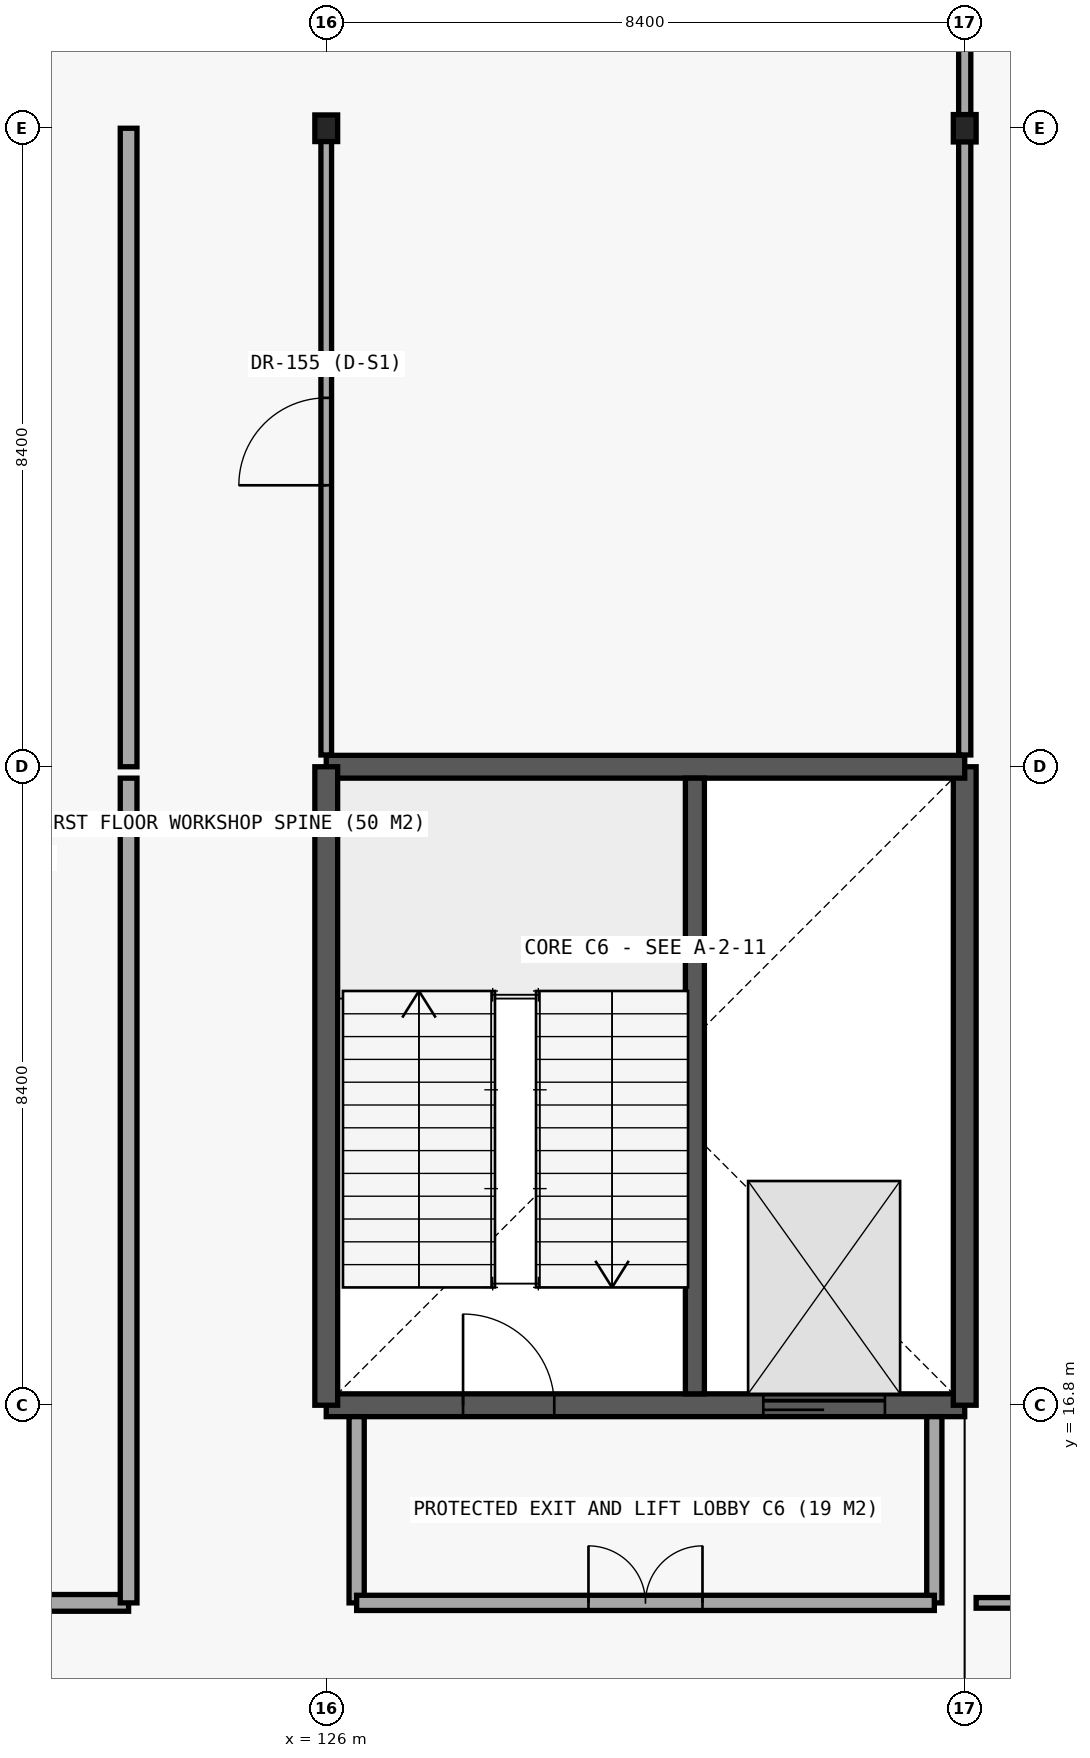
"""IFC4 building model, lengths in metres.
Left out: names, types, materials, properties, quantities, classifications, styles, units other than length and angle.
Written with IfcOpenShell. Run it as: python <this file> out.ifc"""

import sys

from ifc_helpers import new_model, si_unit, direction, frame, frame_2d, origin, origin_2d, place, context, subcontext, project, spatial, rectangle, i_section, extrude, element, fill, save


model = new_model("IFC4")
c1 = context("Model", 3, precision=1e-05, world=origin(), true_north=direction((0.0, 1.0)))
c2 = subcontext(c1, "Body", "Model", "MODEL_VIEW")
j1 = project(units=[si_unit("LENGTHUNIT", "METRE"), si_unit("PLANEANGLEUNIT", "RADIAN")], contexts=[c1])
p1 = place(None, origin())
s1 = spatial("IfcSite", under=j1, at=p1, CompositionType="ELEMENT")
p2 = place(p1, origin())
s2 = spatial("IfcBuilding", under=s1, at=p2, CompositionType="ELEMENT")
p3 = place(p2, frame((0.0, 0.0, 4.8)))
s3 = spatial("IfcBuildingStorey", under=s2, at=p3, CompositionType="ELEMENT", Elevation=4.8)
p4 = place(p3, frame((126.0, 16.8, 0.0), z_axis=(0.0, 0.0, 1.0), x_axis=(1.0, 0.0, 0.0)))
e1 = element("IfcWall", 1, at=p4, inside=s3, PredefinedType="SHEAR", context=c2, shape_type="SweptSolid", body=[
    extrude(rectangle(XDim=8.4, YDim=0.3, at=frame_2d((4.2, 0.0))), origin(), (0.0, 0.0, 1.0), 4.2),
])
p5 = place(p4, frame((1.8, 0.0, 0.0)))
e2 = element("IfcOpeningElement", 2, at=p5, cuts=e1, PredefinedType="OPENING", context=c2, shape_type="SweptSolid", body=[
    extrude(rectangle(XDim=1.2, YDim=2.2, at=frame_2d((0.6, 1.1))), frame((0.0, 0.16, 0.0), z_axis=(0.0, -1.0, 0.0), x_axis=(1.0, 0.0, 0.0)), (0.0, 0.0, 1.0), 0.32),
])
p6 = place(p4, frame((5.75, 0.0, 0.0)))
e3 = element("IfcOpeningElement", 3, at=p6, cuts=e1, PredefinedType="OPENING", context=c2, shape_type="SweptSolid", body=[
    extrude(rectangle(XDim=1.6, YDim=2.4, at=frame_2d((0.8, 1.2))), frame((0.0, 0.16, 0.0), z_axis=(0.0, -1.0, 0.0), x_axis=(1.0, 0.0, 0.0)), (0.0, 0.0, 1.0), 0.32),
])
for number, where, z_axis, x_axis in (
    (4, (134.4, 16.8, 0.0), (0.0, 0.0, 1.0), (0.0, 1.0, 0.0)),
    (5, (134.4, 25.2, 0.0), (0.0, 0.0, 1.0), (-1.0, 0.0, 0.0)),
    (6, (126.0, 25.2, 0.0), (0.0, 0.0, 1.0), (0.0, -1.0, 0.0)),
):
    element("IfcWall", number, at=place(p3, frame(where, z_axis=z_axis, x_axis=x_axis)), inside=s3, PredefinedType="SHEAR", context=c2, shape_type="SweptSolid", body=[
        extrude(rectangle(XDim=8.4, YDim=0.3, at=frame_2d((4.2, 0.0))), origin(), (0.0, 0.0, 1.0), 4.2),
    ])
p7 = place(p3, frame((130.85, 16.95, 0.0), z_axis=(0.0, 0.0, 1.0), x_axis=(0.0, 1.0, 0.0)))
e7 = element("IfcWall", 7, at=p7, inside=s3, PredefinedType="SHEAR", context=c2, shape_type="SweptSolid", body=[
    extrude(rectangle(XDim=8.1, YDim=0.25, at=frame_2d((4.05, 0.0))), origin(), (0.0, 0.0, 1.0), 4.2),
])
p8 = place(p3, frame((126.0, 33.6, 0.0), z_axis=(0.0, 0.0, 1.0), x_axis=(1.0, 0.0, 0.0)))
e8 = element("IfcColumn", 8, at=p8, inside=s3, PredefinedType="COLUMN", context=c2, shape_type="SweptSolid", body=[
    extrude(i_section(OverallWidth=0.3, OverallDepth=0.35, WebThickness=0.01, FlangeThickness=0.018, FilletRadius=0.027, at=origin_2d()), origin(), (0.0, 0.0, 1.0), 4.2),
])
p9 = place(p3, frame((134.4, 33.6, 0.0), z_axis=(0.0, 0.0, 1.0), x_axis=(1.0, 0.0, 0.0)))
e9 = element("IfcColumn", 9, at=p9, inside=s3, PredefinedType="COLUMN", context=c2, shape_type="SweptSolid", body=[
    extrude(i_section(OverallWidth=0.3, OverallDepth=0.36, WebThickness=0.012, FlangeThickness=0.022, FilletRadius=0.027, at=origin_2d()), origin(), (0.0, 0.0, 1.0), 4.2),
])
for number, where, z_axis, x_axis in (
    (10, (126.4, 14.2, 0.0), (0.0, 0.0, 1.0), (0.0, 1.0, 0.0)),
    (11, (134.0, 14.2, 0.0), (0.0, 0.0, 1.0), (0.0, 1.0, 0.0)),
):
    element("IfcWall", number, at=place(p3, frame(where, z_axis=z_axis, x_axis=x_axis)), inside=s3, PredefinedType="PARTITIONING", context=c2, shape_type="SweptSolid", body=[
        extrude(rectangle(XDim=2.45, YDim=0.2, at=frame_2d((1.225, 0.0))), origin(), (0.0, 0.0, 1.0), 3.52),
    ])
p10 = place(p3, frame((126.4, 14.2, 0.0), z_axis=(0.0, 0.0, 1.0), x_axis=(1.0, 0.0, 0.0)))
e12 = element("IfcWall", 12, at=p10, inside=s3, PredefinedType="PARTITIONING", context=c2, shape_type="SweptSolid", body=[
    extrude(rectangle(XDim=7.6, YDim=0.2, at=frame_2d((3.8, 0.0))), origin(), (0.0, 0.0, 1.0), 3.52),
])
p11 = place(p10, frame((3.05, 0.0, 0.0)))
e13 = element("IfcOpeningElement", 13, at=p11, cuts=e12, PredefinedType="OPENING", context=c2, shape_type="SweptSolid", body=[
    extrude(rectangle(XDim=1.5, YDim=2.2, at=frame_2d((0.75, 1.1))), frame((0.0, 0.11, 0.0), z_axis=(0.0, -1.0, 0.0), x_axis=(1.0, 0.0, 0.0)), (0.0, 0.0, 1.0), 0.22),
])
p12 = place(p3, frame((109.2, 14.2, 0.0), z_axis=(0.0, 0.0, 1.0), x_axis=(1.0, 0.0, 0.0)))
e14 = element("IfcWall", 14, at=p12, inside=s3, PredefinedType="PARTITIONING", context=c2, shape_type="SweptSolid", body=[
    extrude(rectangle(XDim=14.2, YDim=0.22, at=frame_2d((7.1, 0.0))), origin(), (0.0, 0.0, 1.0), 3.5),
])
p13 = place(p12, frame((6.475, 0.0, 0.0)))
e15 = element("IfcOpeningElement", 15, at=p13, cuts=e14, PredefinedType="OPENING", context=c2, shape_type="SweptSolid", body=[
    extrude(rectangle(XDim=1.25, YDim=2.2, at=frame_2d((0.625, 1.1))), frame((0.0, 0.12, 0.0), z_axis=(0.0, -1.0, 0.0), x_axis=(1.0, 0.0, 0.0)), (0.0, 0.0, 1.0), 0.24),
])
p14 = place(p3, frame((134.55, 14.2, 0.0), z_axis=(0.0, 0.0, 1.0), x_axis=(1.0, 0.0, 0.0)))
e16 = element("IfcWall", 16, at=p14, inside=s3, PredefinedType="PARTITIONING", context=c2, shape_type="SweptSolid", body=[
    extrude(rectangle(XDim=7.85, YDim=0.14, at=frame_2d((3.925, 0.0))), origin(), (0.0, 0.0, 1.0), 3.5),
])
p15 = place(p3, frame((123.4, 14.2, 0.0), z_axis=(0.0, 0.0, 1.0), x_axis=(0.0, 1.0, 0.0)))
e17 = element("IfcWall", 17, at=p15, inside=s3, PredefinedType="PARTITIONING", context=c2, shape_type="SweptSolid", body=[
    extrude(rectangle(XDim=10.85, YDim=0.22, at=frame_2d((5.425, 0.0))), origin(), (0.0, 0.0, 1.0), 3.5),
])
p16 = place(p3, frame((123.4, 25.2, 0.0), z_axis=(0.0, 0.0, 1.0), x_axis=(0.0, 1.0, 0.0)))
e18 = element("IfcWall", 18, at=p16, inside=s3, PredefinedType="PARTITIONING", context=c2, shape_type="SweptSolid", body=[
    extrude(rectangle(XDim=8.4, YDim=0.22, at=frame_2d((4.2, 0.0))), origin(), (0.0, 0.0, 1.0), 3.5),
])
p17 = place(p3, frame((126.0, 25.355, 0.0), z_axis=(0.0, 0.0, 1.0), x_axis=(0.0, 1.0, 0.0)))
e19 = element("IfcWall", 19, at=p17, inside=s3, PredefinedType="PARTITIONING", context=c2, shape_type="SweptSolid", body=[
    extrude(rectangle(XDim=8.245, YDim=0.14, at=frame_2d((4.123, 0.0))), origin(), (0.0, 0.0, 1.0), 3.45),
])
p18 = place(p17, frame((3.548, 0.0, 0.0)))
e20 = element("IfcOpeningElement", 20, at=p18, cuts=e19, PredefinedType="OPENING", context=c2, shape_type="SweptSolid", body=[
    extrude(rectangle(XDim=1.15, YDim=2.15, at=frame_2d((0.575, 1.075))), frame((0.0, 0.08, 0.0), z_axis=(0.0, -1.0, 0.0), x_axis=(1.0, 0.0, 0.0)), (0.0, 0.0, 1.0), 0.16),
])
p19 = place(p3, frame((134.4, 25.355, 0.0), z_axis=(0.0, 0.0, 1.0), x_axis=(0.0, 1.0, 0.0)))
e21 = element("IfcWall", 21, at=p19, inside=s3, PredefinedType="PARTITIONING", context=c2, shape_type="SweptSolid", body=[
    extrude(rectangle(XDim=24.89, YDim=0.16, at=frame_2d((12.445, 0.0))), origin(), (0.0, 0.0, 1.0), 3.45),
])
p20 = place(p5, origin())
e22 = element("IfcDoor", 22, at=p20, inside=s3, OperationType="SINGLE_SWING_LEFT", PredefinedType="DOOR", context=c2, shape_type="SweptSolid", body=[
    extrude(rectangle(XDim=1.2, YDim=2.2, at=frame_2d((0.6, 1.1))), frame((0.0, 0.025, 0.0), z_axis=(0.0, -1.0, 0.0), x_axis=(1.0, 0.0, 0.0)), (0.0, 0.0, 1.0), 0.05),
])
fill(e2, e22)
p21 = place(p6, origin())
e23 = element("IfcDoor", 23, at=p21, inside=s3, OperationType="SLIDING_TO_LEFT", PredefinedType="DOOR", context=c2, shape_type="SweptSolid", body=[
    extrude(rectangle(XDim=1.6, YDim=2.4, at=frame_2d((0.8, 1.2))), frame((0.0, 0.025, 0.0), z_axis=(0.0, -1.0, 0.0), x_axis=(1.0, 0.0, 0.0)), (0.0, 0.0, 1.0), 0.05),
])
fill(e3, e23)
p22 = place(p11, origin())
e24 = element("IfcDoor", 24, at=p22, inside=s3, OperationType="DOUBLE_DOOR_SINGLE_SWING", PredefinedType="DOOR", context=c2, shape_type="SweptSolid", body=[
    extrude(rectangle(XDim=1.5, YDim=2.2, at=frame_2d((0.75, 1.1))), frame((0.0, 0.025, 0.0), z_axis=(0.0, -1.0, 0.0), x_axis=(1.0, 0.0, 0.0)), (0.0, 0.0, 1.0), 0.05),
])
fill(e13, e24)
p23 = place(p18, origin())
e25 = element("IfcDoor", 25, at=p23, inside=s3, OperationType="SINGLE_SWING_LEFT", PredefinedType="DOOR", context=c2, shape_type="SweptSolid", body=[
    extrude(rectangle(XDim=1.15, YDim=2.15, at=frame_2d((0.575, 1.075))), frame((0.0, 0.025, 0.0), z_axis=(0.0, -1.0, 0.0), x_axis=(1.0, 0.0, 0.0)), (0.0, 0.0, 1.0), 0.05),
])
fill(e20, e25)
save(model, sys.argv[1])
